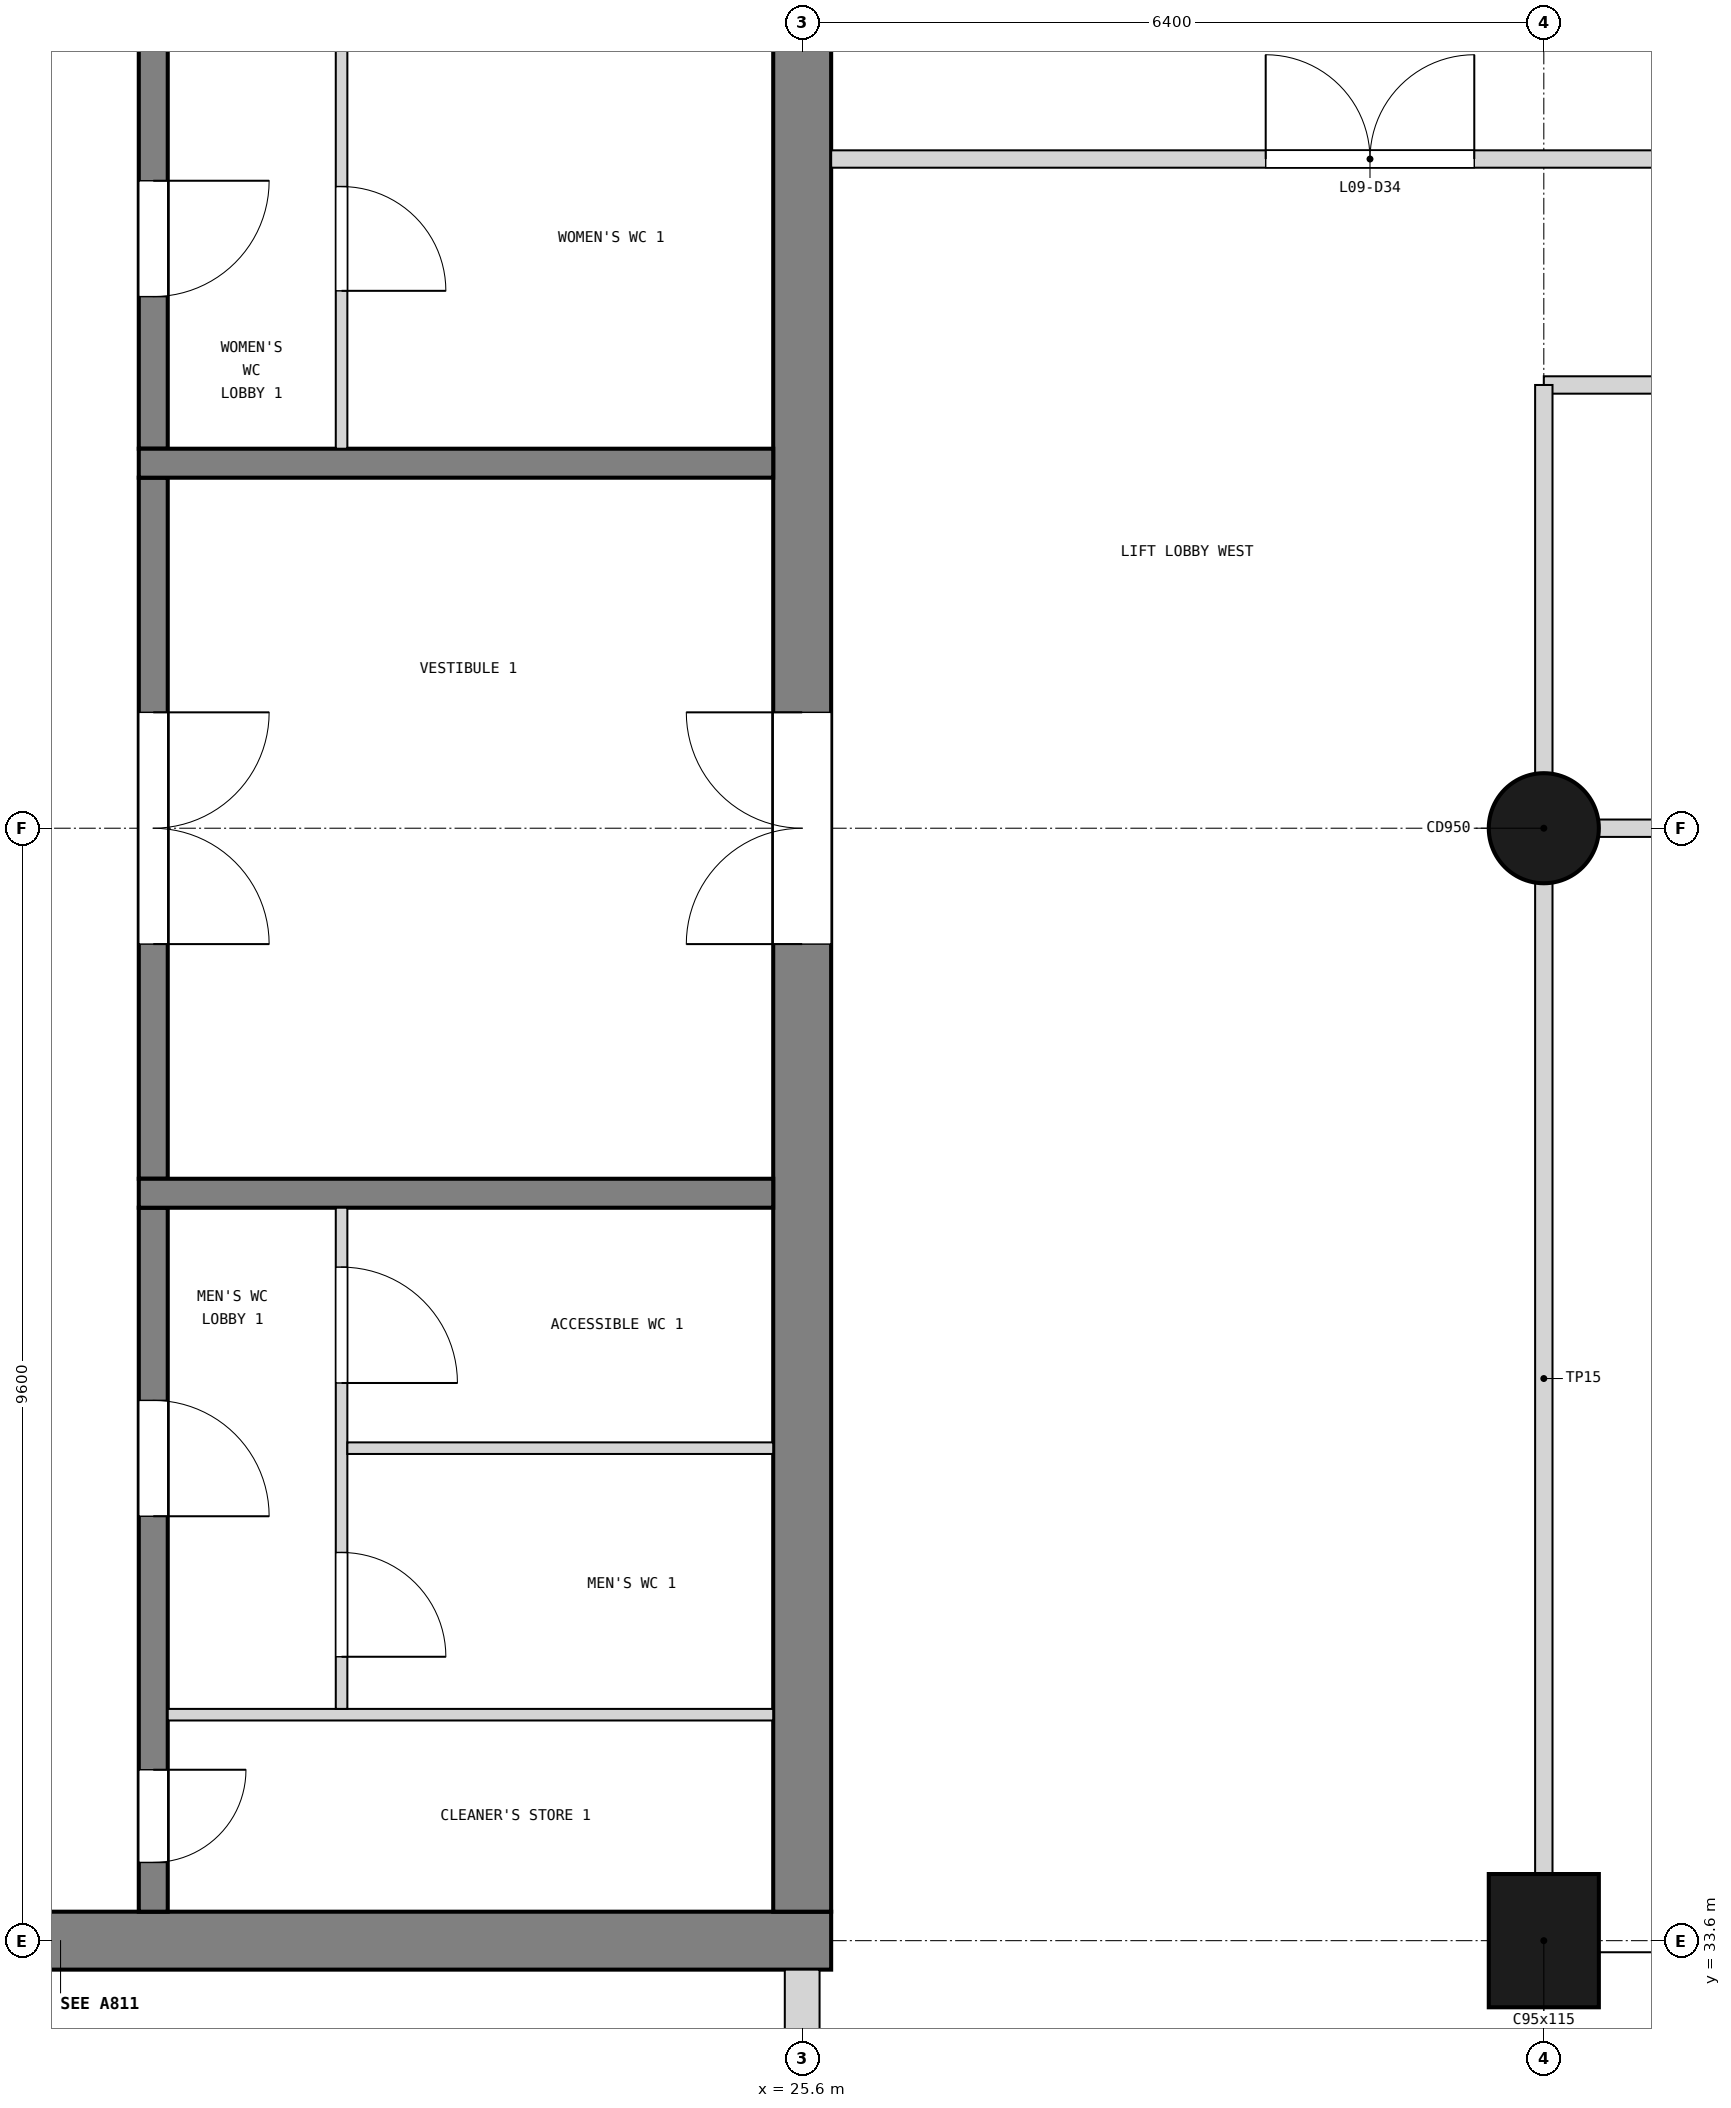
"""IFC4 building model, lengths in metres.
Left out: names, types, materials, properties, quantities, classifications, styles, units other than length and angle.
Written with IfcOpenShell. Run it as: python <this file> out.ifc"""

import sys

from ifc_helpers import new_model, si_unit, direction, frame, frame_2d, origin, origin_2d, place, context, subcontext, project, spatial, rectangle, circle, extrude, element, fill, save


model = new_model("IFC4")
c1 = context("Model", 3, precision=1e-05, world=origin(), true_north=direction((0.0, 1.0)))
c2 = subcontext(c1, "Body", "Model", "MODEL_VIEW")
j1 = project(units=[si_unit("LENGTHUNIT", "METRE"), si_unit("PLANEANGLEUNIT", "RADIAN")], contexts=[c1])
p1 = place(None, origin())
s1 = spatial("IfcSite", under=j1, at=p1, CompositionType="ELEMENT")
p2 = place(p1, origin())
s2 = spatial("IfcBuilding", under=s1, at=p2, CompositionType="ELEMENT")
p3 = place(p2, frame((0.0, 0.0, 36.6)))
s3 = spatial("IfcBuildingStorey", under=s2, at=p3, CompositionType="ELEMENT", Elevation=36.6)
p4 = place(p3, frame((12.55, 33.6, 0.0), z_axis=(0.0, 0.0, 1.0), x_axis=(1.0, 0.0, 0.0)))
e1 = element("IfcWall", 1, at=p4, inside=s3, PredefinedType="SHEAR", context=c2, shape_type="SweptSolid", body=[
    extrude(rectangle(XDim=13.3, YDim=0.5, at=frame_2d((6.65, 0.0))), origin(), (0.0, 0.0, 1.0), 3.9),
])
p5 = place(p4, frame((1.85, 0.0, 1.0)))
e2 = element("IfcOpeningElement", 2, at=p5, cuts=e1, PredefinedType="OPENING", context=c2, shape_type="SweptSolid", body=[
    extrude(rectangle(XDim=0.4, YDim=2.0, at=frame_2d((0.2, 1.0))), frame((0.0, 0.26, 0.0), z_axis=(0.0, -1.0, 0.0), x_axis=(1.0, 0.0, 0.0)), (0.0, 0.0, 1.0), 0.52),
])
p6 = place(p3, frame((25.6, 33.85, 0.0), z_axis=(0.0, 0.0, 1.0), x_axis=(0.0, 1.0, 0.0)))
e3 = element("IfcWall", 3, at=p6, inside=s3, PredefinedType="SHEAR", context=c2, shape_type="SweptSolid", body=[
    extrude(rectangle(XDim=18.7, YDim=0.5, at=frame_2d((9.35, 0.0))), origin(), (0.0, 0.0, 1.0), 3.9),
])
p7 = place(p6, frame((8.35, 0.0, 0.0)))
e4 = element("IfcOpeningElement", 4, at=p7, cuts=e3, PredefinedType="OPENING", context=c2, shape_type="SweptSolid", body=[
    extrude(rectangle(XDim=2.0, YDim=2.1, at=frame_2d((1.0, 1.05))), frame((0.0, 0.26, 0.0), z_axis=(0.0, -1.0, 0.0), x_axis=(1.0, 0.0, 0.0)), (0.0, 0.0, 1.0), 0.52),
])
p8 = place(p3, frame((32.0, 33.6, 0.0), z_axis=(0.0, 0.0, 1.0), x_axis=(1.0, 0.0, 0.0)))
e5 = element("IfcColumn", 5, at=p8, inside=s3, PredefinedType="COLUMN", context=c2, shape_type="SweptSolid", body=[
    extrude(rectangle(XDim=0.95, YDim=1.15, at=origin_2d()), origin(), (0.0, 0.0, 1.0), 3.9),
])
p9 = place(p3, frame((32.0, 43.2, 0.0), z_axis=(0.0, 0.0, 1.0), x_axis=(1.0, 0.0, 0.0)))
e6 = element("IfcColumn", 6, at=p9, inside=s3, PredefinedType="COLUMN", context=c2, shape_type="SweptSolid", body=[
    extrude(circle(Radius=0.475, at=origin_2d()), origin(), (0.0, 0.0, 1.0), 3.9),
])
p10 = place(p3, frame((25.6, 31.0, 0.0), z_axis=(0.0, 0.0, 1.0), x_axis=(0.0, 1.0, 0.0)))
e7 = element("IfcWall", 7, at=p10, inside=s3, PredefinedType="SOLIDWALL", context=c2, shape_type="SweptSolid", body=[
    extrude(rectangle(XDim=2.35, YDim=0.3, at=frame_2d((1.175, 0.0))), origin(), (0.0, 0.0, 1.0), 2.88),
])
p11 = place(p3, frame((20.0, 33.85, 0.0), z_axis=(0.0, 0.0, 1.0), x_axis=(0.0, 1.0, 0.0)))
e8 = element("IfcWall", 8, at=p11, inside=s3, PredefinedType="SOLIDWALL", context=c2, shape_type="SweptSolid", body=[
    extrude(rectangle(XDim=6.075, YDim=0.25, at=frame_2d((3.038, 0.0))), origin(), (0.0, 0.0, 1.0), 3.6),
])
p12 = place(p11, frame((0.425, 0.0, 0.0)))
e9 = element("IfcOpeningElement", 9, at=p12, cuts=e8, PredefinedType="OPENING", context=c2, shape_type="SweptSolid", body=[
    extrude(rectangle(XDim=0.8, YDim=2.1, at=frame_2d((0.4, 1.05))), frame((0.0, 0.135, 0.0), z_axis=(0.0, -1.0, 0.0), x_axis=(1.0, 0.0, 0.0)), (0.0, 0.0, 1.0), 0.27),
])
p13 = place(p11, frame((3.413, 0.0, 0.0)))
e10 = element("IfcOpeningElement", 10, at=p13, cuts=e8, PredefinedType="OPENING", context=c2, shape_type="SweptSolid", body=[
    extrude(rectangle(XDim=1.0, YDim=2.1, at=frame_2d((0.5, 1.05))), frame((0.0, 0.135, 0.0), z_axis=(0.0, -1.0, 0.0), x_axis=(1.0, 0.0, 0.0)), (0.0, 0.0, 1.0), 0.27),
])
p14 = place(p3, frame((20.0, 40.175, 0.0), z_axis=(0.0, 0.0, 1.0), x_axis=(0.0, 1.0, 0.0)))
e11 = element("IfcWall", 11, at=p14, inside=s3, PredefinedType="SOLIDWALL", context=c2, shape_type="SweptSolid", body=[
    extrude(rectangle(XDim=6.05, YDim=0.25, at=frame_2d((3.025, 0.0))), origin(), (0.0, 0.0, 1.0), 3.6),
])
p15 = place(p14, frame((2.025, 0.0, 0.0)))
e12 = element("IfcOpeningElement", 12, at=p15, cuts=e11, PredefinedType="OPENING", context=c2, shape_type="SweptSolid", body=[
    extrude(rectangle(XDim=2.0, YDim=2.1, at=frame_2d((1.0, 1.05))), frame((0.0, 0.135, 0.0), z_axis=(0.0, -1.0, 0.0), x_axis=(1.0, 0.0, 0.0)), (0.0, 0.0, 1.0), 0.27),
])
p16 = place(p3, frame((20.0, 46.475, 0.0), z_axis=(0.0, 0.0, 1.0), x_axis=(0.0, 1.0, 0.0)))
e13 = element("IfcWall", 13, at=p16, inside=s3, PredefinedType="SOLIDWALL", context=c2, shape_type="SweptSolid", body=[
    extrude(rectangle(XDim=6.075, YDim=0.25, at=frame_2d((3.038, 0.0))), origin(), (0.0, 0.0, 1.0), 3.6),
])
p17 = place(p16, frame((1.312, 0.0, 0.0)))
e14 = element("IfcOpeningElement", 14, at=p17, cuts=e13, PredefinedType="OPENING", context=c2, shape_type="SweptSolid", body=[
    extrude(rectangle(XDim=1.0, YDim=2.1, at=frame_2d((0.5, 1.05))), frame((0.0, 0.135, 0.0), z_axis=(0.0, -1.0, 0.0), x_axis=(1.0, 0.0, 0.0)), (0.0, 0.0, 1.0), 0.27),
])
p18 = place(p16, frame((4.45, 0.0, 0.0)))
e15 = element("IfcOpeningElement", 15, at=p18, cuts=e13, PredefinedType="OPENING", context=c2, shape_type="SweptSolid", body=[
    extrude(rectangle(XDim=0.9, YDim=2.1, at=frame_2d((0.45, 1.05))), frame((0.0, 0.135, 0.0), z_axis=(0.0, -1.0, 0.0), x_axis=(1.0, 0.0, 0.0)), (0.0, 0.0, 1.0), 0.27),
])
for number, where, z_axis, x_axis in (
    (16, (19.875, 40.05, 0.0), (0.0, 0.0, 1.0), (1.0, 0.0, 0.0)),
    (17, (19.875, 46.35, 0.0), (0.0, 0.0, 1.0), (1.0, 0.0, 0.0)),
):
    element("IfcWall", number, at=place(p3, frame(where, z_axis=z_axis, x_axis=x_axis)), inside=s3, PredefinedType="SOLIDWALL", context=c2, shape_type="SweptSolid", body=[
        extrude(rectangle(XDim=5.475, YDim=0.25, at=frame_2d((2.738, 0.0))), origin(), (0.0, 0.0, 1.0), 3.6),
    ])
p19 = place(p3, frame((20.125, 35.55, 0.0), z_axis=(0.0, 0.0, 1.0), x_axis=(1.0, 0.0, 0.0)))
e18 = element("IfcWall", 18, at=p19, inside=s3, PredefinedType="PARTITIONING", context=c2, shape_type="SweptSolid", body=[
    extrude(rectangle(XDim=5.225, YDim=0.1, at=frame_2d((2.613, 0.0))), origin(), (0.0, 0.0, 1.0), 3.6),
])
p20 = place(p3, frame((21.625, 35.6, 0.0), z_axis=(0.0, 0.0, 1.0), x_axis=(0.0, 1.0, 0.0)))
e19 = element("IfcWall", 19, at=p20, inside=s3, PredefinedType="PARTITIONING", context=c2, shape_type="SweptSolid", body=[
    extrude(rectangle(XDim=4.325, YDim=0.1, at=frame_2d((2.163, 0.0))), origin(), (0.0, 0.0, 1.0), 3.6),
])
p21 = place(p20, frame((0.45, 0.0, 0.0)))
e20 = element("IfcOpeningElement", 20, at=p21, cuts=e19, PredefinedType="OPENING", context=c2, shape_type="SweptSolid", body=[
    extrude(rectangle(XDim=0.9, YDim=2.1, at=frame_2d((0.45, 1.05))), frame((0.0, 0.06, 0.0), z_axis=(0.0, -1.0, 0.0), x_axis=(1.0, 0.0, 0.0)), (0.0, 0.0, 1.0), 0.12),
])
p22 = place(p20, frame((2.812, 0.0, 0.0)))
e21 = element("IfcOpeningElement", 21, at=p22, cuts=e19, PredefinedType="OPENING", context=c2, shape_type="SweptSolid", body=[
    extrude(rectangle(XDim=1.0, YDim=2.1, at=frame_2d((0.5, 1.05))), frame((0.0, 0.06, 0.0), z_axis=(0.0, -1.0, 0.0), x_axis=(1.0, 0.0, 0.0)), (0.0, 0.0, 1.0), 0.12),
])
p23 = place(p3, frame((21.675, 37.85, 0.0), z_axis=(0.0, 0.0, 1.0), x_axis=(1.0, 0.0, 0.0)))
e22 = element("IfcWall", 22, at=p23, inside=s3, PredefinedType="PARTITIONING", context=c2, shape_type="SweptSolid", body=[
    extrude(rectangle(XDim=3.675, YDim=0.1, at=frame_2d((1.837, 0.0))), origin(), (0.0, 0.0, 1.0), 3.6),
])
p24 = place(p3, frame((21.625, 46.475, 0.0), z_axis=(0.0, 0.0, 1.0), x_axis=(0.0, 1.0, 0.0)))
e23 = element("IfcWall", 23, at=p24, inside=s3, PredefinedType="PARTITIONING", context=c2, shape_type="SweptSolid", body=[
    extrude(rectangle(XDim=3.625, YDim=0.1, at=frame_2d((1.812, 0.0))), origin(), (0.0, 0.0, 1.0), 3.6),
])
p25 = place(p24, frame((1.363, 0.0, 0.0)))
e24 = element("IfcOpeningElement", 24, at=p25, cuts=e23, PredefinedType="OPENING", context=c2, shape_type="SweptSolid", body=[
    extrude(rectangle(XDim=0.9, YDim=2.1, at=frame_2d((0.45, 1.05))), frame((0.0, 0.06, 0.0), z_axis=(0.0, -1.0, 0.0), x_axis=(1.0, 0.0, 0.0)), (0.0, 0.0, 1.0), 0.12),
])
p26 = place(p3, frame((32.0, 47.025, 0.0), z_axis=(0.0, 0.0, 1.0), x_axis=(1.0, 0.0, 0.0)))
e25 = element("IfcWall", 25, at=p26, inside=s3, PredefinedType="PARTITIONING", context=c2, shape_type="SweptSolid", body=[
    extrude(rectangle(XDim=6.22, YDim=0.15, at=frame_2d((3.11, 0.0))), origin(), (0.0, 0.0, 1.0), 3.68),
])
p27 = place(p26, frame((2.6, 0.0, 0.0)))
e26 = element("IfcOpeningElement", 26, at=p27, cuts=e25, PredefinedType="OPENING", context=c2, shape_type="SweptSolid", body=[
    extrude(rectangle(XDim=1.0, YDim=2.1, at=frame_2d((0.5, 1.05))), frame((0.0, 0.085, 0.0), z_axis=(0.0, -1.0, 0.0), x_axis=(1.0, 0.0, 0.0)), (0.0, 0.0, 1.0), 0.17),
])
p28 = place(p3, frame((25.85, 48.975, 0.0), z_axis=(0.0, 0.0, 1.0), x_axis=(1.0, 0.0, 0.0)))
e27 = element("IfcWall", 27, at=p28, inside=s3, PredefinedType="PARTITIONING", context=c2, shape_type="SweptSolid", body=[
    extrude(rectangle(XDim=9.35, YDim=0.15, at=frame_2d((4.675, 0.0))), origin(), (0.0, 0.0, 1.0), 3.68),
])
p29 = place(p28, frame((3.75, 0.0, 0.0)))
e28 = element("IfcOpeningElement", 28, at=p29, cuts=e27, PredefinedType="OPENING", context=c2, shape_type="SweptSolid", body=[
    extrude(rectangle(XDim=1.8, YDim=2.1, at=frame_2d((0.9, 1.05))), frame((0.0, 0.085, 0.0), z_axis=(0.0, -1.0, 0.0), x_axis=(1.0, 0.0, 0.0)), (0.0, 0.0, 1.0), 0.17),
])
p30 = place(p3, frame((32.0, 33.6, 0.0), z_axis=(0.0, 0.0, 1.0), x_axis=(0.0, 1.0, 0.0)))
e29 = element("IfcWall", 29, at=p30, inside=s3, PredefinedType="PARTITIONING", context=c2, shape_type="SweptSolid", body=[
    extrude(rectangle(XDim=13.425, YDim=0.15, at=frame_2d((6.712, 0.0))), origin(), (0.0, 0.0, 1.0), 2.78),
])
p31 = place(p3, frame((32.0, 43.2, 0.0), z_axis=(0.0, 0.0, 1.0), x_axis=(1.0, 0.0, 0.0)))
e30 = element("IfcWall", 30, at=p31, inside=s3, PredefinedType="PARTITIONING", context=c2, shape_type="SweptSolid", body=[
    extrude(rectangle(XDim=25.6, YDim=0.15, at=frame_2d((12.8, 0.0))), origin(), (0.0, 0.0, 1.0), 2.88),
])
p32 = place(p15, frame((2.0, 0.0, 0.0), z_axis=(0.0, 0.0, 1.0), x_axis=(-1.0, 0.0, 0.0)))
e31 = element("IfcDoor", 31, at=p32, inside=s3, OperationType="DOUBLE_DOOR_SINGLE_SWING", PredefinedType="DOOR", context=c2, shape_type="SweptSolid", body=[
    extrude(rectangle(XDim=2.0, YDim=2.1, at=frame_2d((1.0, 1.05))), frame((0.0, 0.025, 0.0), z_axis=(0.0, -1.0, 0.0), x_axis=(1.0, 0.0, 0.0)), (0.0, 0.0, 1.0), 0.05),
])
fill(e12, e31)
p33 = place(p7, origin())
e32 = element("IfcDoor", 32, at=p33, inside=s3, OperationType="DOUBLE_DOOR_SINGLE_SWING", PredefinedType="DOOR", context=c2, shape_type="SweptSolid", body=[
    extrude(rectangle(XDim=2.0, YDim=2.1, at=frame_2d((1.0, 1.05))), frame((0.0, 0.025, 0.0), z_axis=(0.0, -1.0, 0.0), x_axis=(1.0, 0.0, 0.0)), (0.0, 0.0, 1.0), 0.05),
])
fill(e4, e32)
p34 = place(p12, frame((0.8, 0.0, 0.0), z_axis=(0.0, 0.0, 1.0), x_axis=(-1.0, 0.0, 0.0)))
e33 = element("IfcDoor", 33, at=p34, inside=s3, OperationType="SINGLE_SWING_LEFT", PredefinedType="DOOR", context=c2, shape_type="SweptSolid", body=[
    extrude(rectangle(XDim=0.8, YDim=2.1, at=frame_2d((0.4, 1.05))), frame((0.0, 0.025, 0.0), z_axis=(0.0, -1.0, 0.0), x_axis=(1.0, 0.0, 0.0)), (0.0, 0.0, 1.0), 0.05),
])
fill(e9, e33)
p35 = place(p13, frame((1.0, 0.0, 0.0), z_axis=(0.0, 0.0, 1.0), x_axis=(-1.0, 0.0, 0.0)))
e34 = element("IfcDoor", 34, at=p35, inside=s3, OperationType="SINGLE_SWING_RIGHT", PredefinedType="DOOR", context=c2, shape_type="SweptSolid", body=[
    extrude(rectangle(XDim=1.0, YDim=2.1, at=frame_2d((0.5, 1.05))), frame((0.0, 0.025, 0.0), z_axis=(0.0, -1.0, 0.0), x_axis=(1.0, 0.0, 0.0)), (0.0, 0.0, 1.0), 0.05),
])
fill(e10, e34)
p36 = place(p21, frame((0.9, 0.0, 0.0), z_axis=(0.0, 0.0, 1.0), x_axis=(-1.0, 0.0, 0.0)))
e35 = element("IfcDoor", 35, at=p36, inside=s3, OperationType="SINGLE_SWING_RIGHT", PredefinedType="DOOR", context=c2, shape_type="SweptSolid", body=[
    extrude(rectangle(XDim=0.9, YDim=2.1, at=frame_2d((0.45, 1.05))), frame((0.0, 0.025, 0.0), z_axis=(0.0, -1.0, 0.0), x_axis=(1.0, 0.0, 0.0)), (0.0, 0.0, 1.0), 0.05),
])
fill(e20, e35)
p37 = place(p22, frame((1.0, 0.0, 0.0), z_axis=(0.0, 0.0, 1.0), x_axis=(-1.0, 0.0, 0.0)))
e36 = element("IfcDoor", 36, at=p37, inside=s3, OperationType="SINGLE_SWING_RIGHT", PredefinedType="DOOR", context=c2, shape_type="SweptSolid", body=[
    extrude(rectangle(XDim=1.0, YDim=2.1, at=frame_2d((0.5, 1.05))), frame((0.0, 0.025, 0.0), z_axis=(0.0, -1.0, 0.0), x_axis=(1.0, 0.0, 0.0)), (0.0, 0.0, 1.0), 0.05),
])
fill(e21, e36)
p38 = place(p17, frame((1.0, 0.0, 0.0), z_axis=(0.0, 0.0, 1.0), x_axis=(-1.0, 0.0, 0.0)))
e37 = element("IfcDoor", 37, at=p38, inside=s3, OperationType="SINGLE_SWING_LEFT", PredefinedType="DOOR", context=c2, shape_type="SweptSolid", body=[
    extrude(rectangle(XDim=1.0, YDim=2.1, at=frame_2d((0.5, 1.05))), frame((0.0, 0.025, 0.0), z_axis=(0.0, -1.0, 0.0), x_axis=(1.0, 0.0, 0.0)), (0.0, 0.0, 1.0), 0.05),
])
fill(e14, e37)
p39 = place(p25, frame((0.9, 0.0, 0.0), z_axis=(0.0, 0.0, 1.0), x_axis=(-1.0, 0.0, 0.0)))
e38 = element("IfcDoor", 38, at=p39, inside=s3, OperationType="SINGLE_SWING_RIGHT", PredefinedType="DOOR", context=c2, shape_type="SweptSolid", body=[
    extrude(rectangle(XDim=0.9, YDim=2.1, at=frame_2d((0.45, 1.05))), frame((0.0, 0.025, 0.0), z_axis=(0.0, -1.0, 0.0), x_axis=(1.0, 0.0, 0.0)), (0.0, 0.0, 1.0), 0.05),
])
fill(e24, e38)
p40 = place(p29, origin())
e39 = element("IfcDoor", 39, at=p40, inside=s3, OperationType="DOUBLE_DOOR_SINGLE_SWING", PredefinedType="DOOR", context=c2, shape_type="SweptSolid", body=[
    extrude(rectangle(XDim=1.8, YDim=2.1, at=frame_2d((0.9, 1.05))), frame((0.0, 0.025, 0.0), z_axis=(0.0, -1.0, 0.0), x_axis=(1.0, 0.0, 0.0)), (0.0, 0.0, 1.0), 0.05),
])
fill(e28, e39)
save(model, sys.argv[1])
